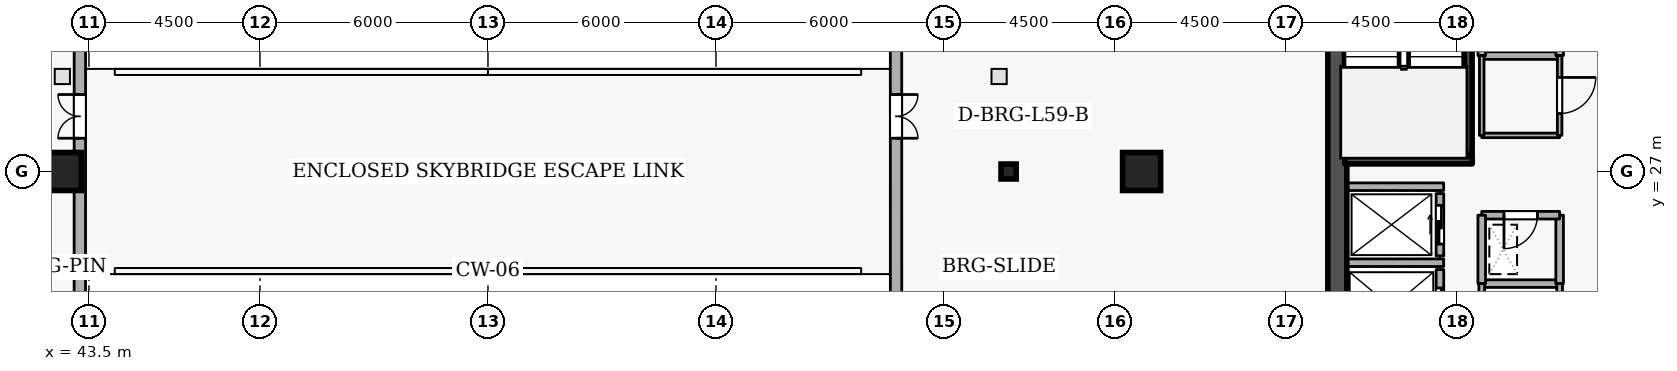
"""IFC4 building model, lengths in metres.
Left out: names, types, materials, properties, quantities, classifications, styles, units other than length and angle.
Written with IfcOpenShell. Run it as: python <this file> out.ifc"""

import sys

from ifc_helpers import new_model, si_unit, direction, frame, frame_2d, origin, origin_2d, place, context, subcontext, project, spatial, rectangle, i_section, extrude, element, fill, save


model = new_model("IFC4")
c1 = context("Model", 3, precision=1e-05, world=origin(), true_north=direction((0.0, 1.0)))
c2 = subcontext(c1, "Body", "Model", "MODEL_VIEW")
j1 = project(units=[si_unit("LENGTHUNIT", "METRE"), si_unit("PLANEANGLEUNIT", "RADIAN")], contexts=[c1])
p1 = place(None, origin())
s1 = spatial("IfcSite", under=j1, at=p1, CompositionType="ELEMENT")
p2 = place(p1, origin())
s2 = spatial("IfcBuilding", under=s1, at=p2, CompositionType="ELEMENT")
p3 = place(p2, frame((0.0, 0.0, 221.7)))
s3 = spatial("IfcBuildingStorey", under=s2, at=p3, CompositionType="ELEMENT", Elevation=221.7)
p4 = place(p3, frame((76.35, 19.2, 0.0), z_axis=(0.0, 0.0, 1.0), x_axis=(0.0, 1.0, 0.0)))
e1 = element("IfcWall", 1, at=p4, inside=s3, PredefinedType="SHEAR", context=c2, shape_type="SweptSolid", body=[
    extrude(rectangle(XDim=15.6, YDim=0.5, at=frame_2d((7.8, 0.0))), origin(), (0.0, 0.0, 1.0), 4.2),
])
for number, where, z_axis, x_axis in (
    (2, (42.8, 27.0, 0.0), (0.0, 0.0, 1.0), (1.0, 0.0, 0.0)),
    (3, (71.2, 27.0, 0.0), (0.0, 0.0, 1.0), (1.0, 0.0, 0.0)),
):
    element("IfcColumn", number, at=place(p3, frame(where, z_axis=z_axis, x_axis=x_axis)), inside=s3, PredefinedType="COLUMN", context=c2, shape_type="SweptSolid", body=[
        extrude(rectangle(XDim=1.0, YDim=1.0, at=origin_2d()), origin(), (0.0, 0.0, 1.0), 4.2),
    ])
p5 = place(p3, frame((67.7, 27.0, 0.0), z_axis=(0.0, 0.0, 1.0), x_axis=(1.0, 0.0, 0.0)))
e4 = element("IfcColumn", 4, at=p5, inside=s3, PredefinedType="COLUMN", context=c2, shape_type="SweptSolid", body=[
    extrude(i_section(OverallWidth=0.399, OverallDepth=0.394, WebThickness=0.023, FlangeThickness=0.037, FilletRadius=0.015, at=origin_2d()), origin(), (0.0, 0.0, 1.0), 4.2),
])
p6 = place(p3, frame((43.259, 13.612, 0.0), z_axis=(0.0, 0.0, 1.0), x_axis=(0.000169493917, 0.999999985636, 0.0)))
e5 = element("IfcWall", 5, at=p6, inside=s3, PredefinedType="STANDARD", context=c2, shape_type="SweptSolid", body=[
    extrude(rectangle(XDim=34.57, YDim=0.3, at=frame_2d((17.285, 0.0))), origin(), (0.0, 0.0, 1.0), 3.3),
])
p7 = place(p6, frame((14.263, 0.0, 0.0)))
e6 = element("IfcOpeningElement", 6, at=p7, cuts=e5, PredefinedType="OPENING", context=c2, shape_type="SweptSolid", body=[
    extrude(rectangle(XDim=1.15, YDim=2.1, at=frame_2d((0.575, 1.05))), frame((0.0, 0.16, 0.0), z_axis=(0.0, -1.0, 0.0), x_axis=(1.0, 0.0, 0.0)), (0.0, 0.0, 1.0), 0.32),
])
p8 = place(p6, frame((2.7, 0.0, 0.72)))
e7 = element("IfcOpeningElement", 7, at=p8, cuts=e5, PredefinedType="OPENING", context=c2, shape_type="SweptSolid", body=[
    extrude(rectangle(XDim=0.9, YDim=1.75, at=frame_2d((0.45, 0.875))), frame((0.0, 0.16, 0.0), z_axis=(0.0, -1.0, 0.0), x_axis=(1.0, 0.0, 0.0)), (0.0, 0.0, 1.0), 0.32),
])
p9 = place(p6, frame((7.5, 0.0, 0.72)))
e8 = element("IfcOpeningElement", 8, at=p9, cuts=e5, PredefinedType="OPENING", context=c2, shape_type="SweptSolid", body=[
    extrude(rectangle(XDim=0.9, YDim=1.75, at=frame_2d((0.45, 0.875))), frame((0.0, 0.16, 0.0), z_axis=(0.0, -1.0, 0.0), x_axis=(1.0, 0.0, 0.0)), (0.0, 0.0, 1.0), 0.32),
])
p10 = place(p6, frame((21.9, 0.0, 0.72)))
e9 = element("IfcOpeningElement", 9, at=p10, cuts=e5, PredefinedType="OPENING", context=c2, shape_type="SweptSolid", body=[
    extrude(rectangle(XDim=0.9, YDim=1.75, at=frame_2d((0.45, 0.875))), frame((0.0, 0.16, 0.0), z_axis=(0.0, -1.0, 0.0), x_axis=(1.0, 0.0, 0.0)), (0.0, 0.0, 1.0), 0.32),
])
p11 = place(p6, frame((31.5, 0.0, 0.72)))
e10 = element("IfcOpeningElement", 10, at=p11, cuts=e5, PredefinedType="OPENING", context=c2, shape_type="SweptSolid", body=[
    extrude(rectangle(XDim=0.9, YDim=1.75, at=frame_2d((0.45, 0.875))), frame((0.0, 0.16, 0.0), z_axis=(0.0, -1.0, 0.0), x_axis=(1.0, 0.0, 0.0)), (0.0, 0.0, 1.0), 0.32),
])
p12 = place(p3, frame((64.735, 42.181, 0.0), z_axis=(0.0, 0.0, 1.0), x_axis=(0.000169493917, -0.999999985636, 0.0)))
e11 = element("IfcWall", 11, at=p12, inside=s3, PredefinedType="STANDARD", context=c2, shape_type="SweptSolid", body=[
    extrude(rectangle(XDim=34.57, YDim=0.3, at=frame_2d((17.285, 0.0))), origin(), (0.0, 0.0, 1.0), 3.3),
])
p13 = place(p12, frame((13.156, 0.0, 0.0)))
e12 = element("IfcOpeningElement", 12, at=p13, cuts=e11, PredefinedType="OPENING", context=c2, shape_type="SweptSolid", body=[
    extrude(rectangle(XDim=1.15, YDim=2.1, at=frame_2d((0.575, 1.05))), frame((0.0, 0.16, 0.0), z_axis=(0.0, -1.0, 0.0), x_axis=(1.0, 0.0, 0.0)), (0.0, 0.0, 1.0), 0.32),
])
p14 = place(p12, frame((2.7, 0.0, 0.72)))
e13 = element("IfcOpeningElement", 13, at=p14, cuts=e11, PredefinedType="OPENING", context=c2, shape_type="SweptSolid", body=[
    extrude(rectangle(XDim=0.9, YDim=1.75, at=frame_2d((0.45, 0.875))), frame((0.0, 0.16, 0.0), z_axis=(0.0, -1.0, 0.0), x_axis=(1.0, 0.0, 0.0)), (0.0, 0.0, 1.0), 0.32),
])
p15 = place(p12, frame((7.5, 0.0, 0.72)))
e14 = element("IfcOpeningElement", 14, at=p15, cuts=e11, PredefinedType="OPENING", context=c2, shape_type="SweptSolid", body=[
    extrude(rectangle(XDim=0.9, YDim=1.75, at=frame_2d((0.45, 0.875))), frame((0.0, 0.16, 0.0), z_axis=(0.0, -1.0, 0.0), x_axis=(1.0, 0.0, 0.0)), (0.0, 0.0, 1.0), 0.32),
])
p16 = place(p12, frame((21.9, 0.0, 0.72)))
e15 = element("IfcOpeningElement", 15, at=p16, cuts=e11, PredefinedType="OPENING", context=c2, shape_type="SweptSolid", body=[
    extrude(rectangle(XDim=0.9, YDim=1.75, at=frame_2d((0.45, 0.875))), frame((0.0, 0.16, 0.0), z_axis=(0.0, -1.0, 0.0), x_axis=(1.0, 0.0, 0.0)), (0.0, 0.0, 1.0), 0.32),
])
p17 = place(p12, frame((26.7, 0.0, 0.72)))
e16 = element("IfcOpeningElement", 16, at=p17, cuts=e11, PredefinedType="OPENING", context=c2, shape_type="SweptSolid", body=[
    extrude(rectangle(XDim=0.9, YDim=1.75, at=frame_2d((0.45, 0.875))), frame((0.0, 0.16, 0.0), z_axis=(0.0, -1.0, 0.0), x_axis=(1.0, 0.0, 0.0)), (0.0, 0.0, 1.0), 0.32),
])
p18 = place(p12, frame((31.5, 0.0, 0.72)))
e17 = element("IfcOpeningElement", 17, at=p18, cuts=e11, PredefinedType="OPENING", context=c2, shape_type="SweptSolid", body=[
    extrude(rectangle(XDim=0.9, YDim=1.75, at=frame_2d((0.45, 0.875))), frame((0.0, 0.16, 0.0), z_axis=(0.0, -1.0, 0.0), x_axis=(1.0, 0.0, 0.0)), (0.0, 0.0, 1.0), 0.32),
])
p19 = place(p3, frame((79.05, 24.78, 0.0), z_axis=(0.0, 0.0, 1.0), x_axis=(0.0, 1.0, 0.0)))
e18 = element("IfcWall", 18, at=p19, inside=s3, PredefinedType="STANDARD", context=c2, shape_type="SweptSolid", body=[
    extrude(rectangle(XDim=1.64, YDim=0.2, at=frame_2d((0.82, 0.0))), origin(), (0.0, 0.0, 1.0), 3.94),
])
p20 = place(p19, frame((0.31, 0.0, 0.0)))
e19 = element("IfcOpeningElement", 19, at=p20, cuts=e18, PredefinedType="OPENING", context=c2, shape_type="SweptSolid", body=[
    extrude(rectangle(XDim=1.02, YDim=2.06, at=frame_2d((0.51, 1.03))), frame((0.0, 0.11, 0.0), z_axis=(0.0, -1.0, 0.0), x_axis=(1.0, 0.0, 0.0)), (0.0, 0.0, 1.0), 0.22),
])
p21 = place(p3, frame((79.05, 22.43, 0.0), z_axis=(0.0, 0.0, 1.0), x_axis=(0.0, 1.0, 0.0)))
e20 = element("IfcWall", 20, at=p21, inside=s3, PredefinedType="STANDARD", context=c2, shape_type="SweptSolid", body=[
    extrude(rectangle(XDim=1.99, YDim=0.2, at=frame_2d((0.995, 0.0))), origin(), (0.0, 0.0, 1.0), 3.94),
])
p22 = place(p21, frame((0.485, 0.0, 0.0)))
e21 = element("IfcOpeningElement", 21, at=p22, cuts=e20, PredefinedType="OPENING", context=c2, shape_type="SweptSolid", body=[
    extrude(rectangle(XDim=1.02, YDim=2.06, at=frame_2d((0.51, 1.03))), frame((0.0, 0.11, 0.0), z_axis=(0.0, -1.0, 0.0), x_axis=(1.0, 0.0, 0.0)), (0.0, 0.0, 1.0), 0.22),
])
for number, where, z_axis, x_axis in (
    (22, (76.612, 26.6, 0.0), (0.0, 0.0, 1.0), (1.0, 0.0, 0.0)),
    (23, (76.612, 24.6, 0.0), (0.0, 0.0, 1.0), (1.0, 0.0, 0.0)),
):
    element("IfcWall", number, at=place(p3, frame(where, z_axis=z_axis, x_axis=x_axis)), inside=s3, PredefinedType="STANDARD", context=c2, shape_type="SweptSolid", body=[
        extrude(rectangle(XDim=2.536, YDim=0.2, at=frame_2d((1.268, 0.0))), origin(), (0.0, 0.0, 1.0), 3.94),
    ])
p23 = place(p3, frame((79.9, 27.3, 0.0), z_axis=(0.0, 0.0, 1.0), x_axis=(-1.0, 0.0, 0.0)))
e24 = element("IfcWall", 24, at=p23, inside=s3, PredefinedType="SHEAR", context=c2, shape_type="SweptSolid", body=[
    extrude(rectangle(XDim=3.35, YDim=0.2, at=frame_2d((1.675, 0.0))), origin(), (0.0, 0.0, 1.0), 4.2),
])
p24 = place(p3, frame((79.797, 27.45, 0.0), z_axis=(0.0, 0.0, 1.0), x_axis=(0.0, 1.0, 0.0)))
e25 = element("IfcWall", 25, at=p24, inside=s3, PredefinedType="SHEAR", context=c2, shape_type="SweptSolid", body=[
    extrude(rectangle(XDim=7.1, YDim=0.2, at=frame_2d((3.55, 0.0))), origin(), (0.0, 0.0, 1.0), 4.2),
])
p25 = place(p3, frame((80.15, 24.05, 0.0), z_axis=(0.0, 0.0, 1.0), x_axis=(1.0, 0.0, 0.0)))
e26 = element("IfcWall", 26, at=p25, inside=s3, PredefinedType="STANDARD", context=c2, shape_type="SweptSolid", body=[
    extrude(rectangle(XDim=2.05, YDim=0.2, at=frame_2d((1.025, 0.0))), origin(), (0.0, 0.0, 1.0), 3.94),
])
p26 = place(p3, frame((82.2, 24.05, 0.0), z_axis=(0.0, 0.0, 1.0), x_axis=(0.0, 1.0, 0.0)))
e27 = element("IfcWall", 27, at=p26, inside=s3, PredefinedType="STANDARD", context=c2, shape_type="SweptSolid", body=[
    extrude(rectangle(XDim=1.8, YDim=0.2, at=frame_2d((0.9, 0.0))), origin(), (0.0, 0.0, 1.0), 3.94),
])
p27 = place(p3, frame((82.2, 25.85, 0.0), z_axis=(0.0, 0.0, 1.0), x_axis=(-1.0, 0.0, 0.0)))
e28 = element("IfcWall", 28, at=p27, inside=s3, PredefinedType="STANDARD", context=c2, shape_type="SweptSolid", body=[
    extrude(rectangle(XDim=2.05, YDim=0.2, at=frame_2d((1.025, 0.0))), origin(), (0.0, 0.0, 1.0), 3.94),
])
p28 = place(p27, frame((0.585, 0.0, 0.0)))
e29 = element("IfcOpeningElement", 29, at=p28, cuts=e28, PredefinedType="OPENING", context=c2, shape_type="SweptSolid", body=[
    extrude(rectangle(XDim=0.88, YDim=2.04, at=frame_2d((0.44, 1.02))), frame((0.0, 0.11, 0.0), z_axis=(0.0, -1.0, 0.0), x_axis=(1.0, 0.0, 0.0)), (0.0, 0.0, 1.0), 0.22),
])
p29 = place(p3, frame((80.15, 25.85, 0.0), z_axis=(0.0, 0.0, 1.0), x_axis=(0.0, -1.0, 0.0)))
e30 = element("IfcWall", 30, at=p29, inside=s3, PredefinedType="STANDARD", context=c2, shape_type="SweptSolid", body=[
    extrude(rectangle(XDim=1.8, YDim=0.2, at=frame_2d((0.9, 0.0))), origin(), (0.0, 0.0, 1.0), 3.94),
])
p30 = place(p3, frame((80.15, 30.05, 0.0), z_axis=(0.0, 0.0, 1.0), x_axis=(1.0, 0.0, 0.0)))
e31 = element("IfcWall", 31, at=p30, inside=s3, PredefinedType="STANDARD", context=c2, shape_type="SweptSolid", body=[
    extrude(rectangle(XDim=2.05, YDim=0.2, at=frame_2d((1.025, 0.0))), origin(), (0.0, 0.0, 1.0), 3.94),
])
p31 = place(p3, frame((82.2, 30.05, 0.0), z_axis=(0.0, 0.0, 1.0), x_axis=(0.0, 1.0, 0.0)))
e32 = element("IfcWall", 32, at=p31, inside=s3, PredefinedType="STANDARD", context=c2, shape_type="SweptSolid", body=[
    extrude(rectangle(XDim=1.8, YDim=0.2, at=frame_2d((0.9, 0.0))), origin(), (0.0, 0.0, 1.0), 3.94),
])
p32 = place(p31, frame((0.46, 0.0, 0.0)))
e33 = element("IfcOpeningElement", 33, at=p32, cuts=e32, PredefinedType="OPENING", context=c2, shape_type="SweptSolid", body=[
    extrude(rectangle(XDim=0.88, YDim=2.04, at=frame_2d((0.44, 1.02))), frame((0.0, 0.11, 0.0), z_axis=(0.0, -1.0, 0.0), x_axis=(1.0, 0.0, 0.0)), (0.0, 0.0, 1.0), 0.22),
])
p33 = place(p3, frame((80.15, 31.85, 0.0), z_axis=(0.0, 0.0, 1.0), x_axis=(0.0, -1.0, 0.0)))
e34 = element("IfcWall", 34, at=p33, inside=s3, PredefinedType="STANDARD", context=c2, shape_type="SweptSolid", body=[
    extrude(rectangle(XDim=1.8, YDim=0.2, at=frame_2d((0.9, 0.0))), origin(), (0.0, 0.0, 1.0), 3.94),
])
p34 = place(p3, frame((80.15, 19.8, 0.0), z_axis=(0.0, 0.0, 1.0), x_axis=(0.0, 1.0, 0.0)))
e35 = element("IfcWall", 35, at=p34, inside=s3, PredefinedType="PARTITIONING", context=c2, shape_type="SweptSolid", body=[
    extrude(rectangle(XDim=4.25, YDim=0.15, at=frame_2d((2.125, 0.0))), origin(), (0.0, 0.0, 1.0), 3.94),
])
p35 = place(p3, frame((82.2, 24.05, 0.0), z_axis=(0.0, 0.0, 1.0), x_axis=(0.0, -1.0, 0.0)))
e36 = element("IfcWall", 36, at=p35, inside=s3, PredefinedType="PARTITIONING", context=c2, shape_type="SweptSolid", body=[
    extrude(rectangle(XDim=4.25, YDim=0.15, at=frame_2d((2.125, 0.0))), origin(), (0.0, 0.0, 1.0), 3.94),
])
p36 = place(p35, frame((1.665, 0.0, 0.0)))
e37 = element("IfcOpeningElement", 37, at=p36, cuts=e36, PredefinedType="OPENING", context=c2, shape_type="SweptSolid", body=[
    extrude(rectangle(XDim=0.92, YDim=2.08, at=frame_2d((0.46, 1.04))), frame((0.0, 0.085, 0.0), z_axis=(0.0, -1.0, 0.0), x_axis=(1.0, 0.0, 0.0)), (0.0, 0.0, 1.0), 0.17),
])
p37 = place(p3, frame((82.2, 27.95, 0.0), z_axis=(0.0, 0.0, 1.0), x_axis=(-1.0, 0.0, 0.0)))
e38 = element("IfcWall", 38, at=p37, inside=s3, PredefinedType="PARTITIONING", context=c2, shape_type="SweptSolid", body=[
    extrude(rectangle(XDim=2.05, YDim=0.12, at=frame_2d((1.025, 0.0))), origin(), (0.0, 0.0, 1.0), 3.94),
])
p38 = place(p3, frame((80.15, 27.95, 0.0), z_axis=(0.0, 0.0, 1.0), x_axis=(0.0, 1.0, 0.0)))
e39 = element("IfcWall", 39, at=p38, inside=s3, PredefinedType="PARTITIONING", context=c2, shape_type="SweptSolid", body=[
    extrude(rectangle(XDim=2.1, YDim=0.12, at=frame_2d((1.05, 0.0))), origin(), (0.0, 0.0, 1.0), 3.94),
])
p39 = place(p3, frame((82.2, 30.05, 0.0), z_axis=(0.0, 0.0, 1.0), x_axis=(0.0, -1.0, 0.0)))
e40 = element("IfcWall", 40, at=p39, inside=s3, PredefinedType="PARTITIONING", context=c2, shape_type="SweptSolid", body=[
    extrude(rectangle(XDim=2.1, YDim=0.12, at=frame_2d((1.05, 0.0))), origin(), (0.0, 0.0, 1.0), 3.94),
])
p40 = place(p39, frame((0.575, 0.0, 0.0)))
e41 = element("IfcOpeningElement", 41, at=p40, cuts=e40, PredefinedType="OPENING", context=c2, shape_type="SweptSolid", body=[
    extrude(rectangle(XDim=0.95, YDim=2.1, at=frame_2d((0.475, 1.05))), frame((0.0, 0.07, 0.0), z_axis=(0.0, -1.0, 0.0), x_axis=(1.0, 0.0, 0.0)), (0.0, 0.0, 1.0), 0.14),
])
p41 = place(p7, origin())
e42 = element("IfcDoor", 42, at=p41, inside=s3, OperationType="DOUBLE_DOOR_SINGLE_SWING", PredefinedType="DOOR", context=c2, shape_type="SweptSolid", body=[
    extrude(rectangle(XDim=1.15, YDim=2.1, at=frame_2d((0.575, 1.05))), frame((0.0, 0.025, 0.0), z_axis=(0.0, -1.0, 0.0), x_axis=(1.0, 0.0, 0.0)), (0.0, 0.0, 1.0), 0.05),
])
fill(e6, e42)
p42 = place(p13, origin())
e43 = element("IfcDoor", 43, at=p42, inside=s3, OperationType="DOUBLE_DOOR_SINGLE_SWING", PredefinedType="DOOR", context=c2, shape_type="SweptSolid", body=[
    extrude(rectangle(XDim=1.15, YDim=2.1, at=frame_2d((0.575, 1.05))), frame((0.0, 0.025, 0.0), z_axis=(0.0, -1.0, 0.0), x_axis=(1.0, 0.0, 0.0)), (0.0, 0.0, 1.0), 0.05),
])
fill(e12, e43)
p43 = place(p20, origin())
e44 = element("IfcDoor", 44, at=p43, inside=s3, OperationType="SLIDING_TO_LEFT", PredefinedType="DOOR", context=c2, shape_type="SweptSolid", body=[
    extrude(rectangle(XDim=1.02, YDim=2.06, at=frame_2d((0.51, 1.03))), frame((0.0, 0.025, 0.0), z_axis=(0.0, -1.0, 0.0), x_axis=(1.0, 0.0, 0.0)), (0.0, 0.0, 1.0), 0.05),
])
fill(e19, e44)
p44 = place(p22, origin())
e45 = element("IfcDoor", 45, at=p44, inside=s3, OperationType="SLIDING_TO_LEFT", PredefinedType="DOOR", context=c2, shape_type="SweptSolid", body=[
    extrude(rectangle(XDim=1.02, YDim=2.06, at=frame_2d((0.51, 1.03))), frame((0.0, 0.025, 0.0), z_axis=(0.0, -1.0, 0.0), x_axis=(1.0, 0.0, 0.0)), (0.0, 0.0, 1.0), 0.05),
])
fill(e21, e45)
p45 = place(p28, origin())
e46 = element("IfcDoor", 46, at=p45, inside=s3, OperationType="SINGLE_SWING_RIGHT", PredefinedType="DOOR", context=c2, shape_type="SweptSolid", body=[
    extrude(rectangle(XDim=0.88, YDim=2.04, at=frame_2d((0.44, 1.02))), frame((0.0, 0.025, 0.0), z_axis=(0.0, -1.0, 0.0), x_axis=(1.0, 0.0, 0.0)), (0.0, 0.0, 1.0), 0.05),
])
fill(e29, e46)
p46 = place(p40, origin())
e47 = element("IfcDoor", 47, at=p46, inside=s3, OperationType="SINGLE_SWING_LEFT", PredefinedType="DOOR", context=c2, shape_type="SweptSolid", body=[
    extrude(rectangle(XDim=0.95, YDim=2.1, at=frame_2d((0.475, 1.05))), frame((0.0, 0.025, 0.0), z_axis=(0.0, -1.0, 0.0), x_axis=(1.0, 0.0, 0.0)), (0.0, 0.0, 1.0), 0.05),
])
fill(e41, e47)
save(model, sys.argv[1])
